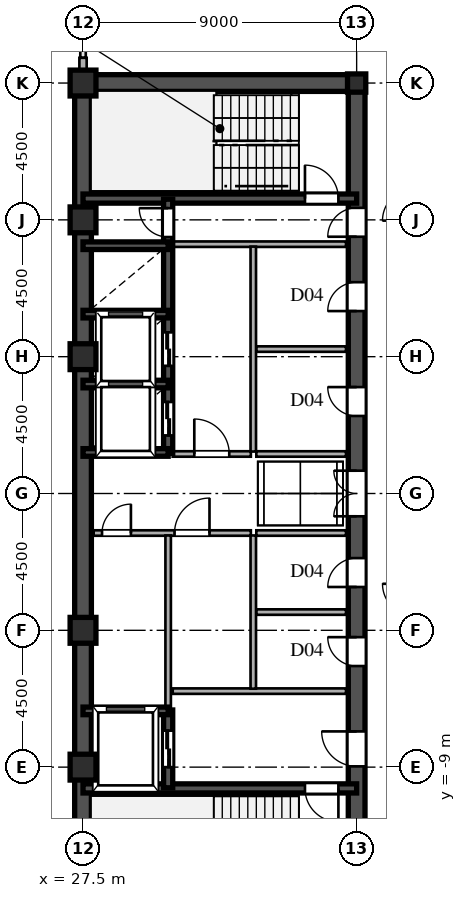
"""IFC4 building model, lengths in metres.
Left out: names, types, materials, properties, quantities, classifications, styles, units other than length and angle.
Written with IfcOpenShell. Run it as: python <this file> out.ifc"""

import sys

from ifc_helpers import new_model, si_unit, direction, frame, frame_2d, origin, origin_2d, place, context, subcontext, project, spatial, rectangle, hollow_rectangle, i_section, extrude, source, transform, mapped, element, fill, save


model = new_model("IFC4")
c1 = context("Model", 3, precision=1e-05, world=origin(), true_north=direction((0.0, 1.0)))
c2 = subcontext(c1, "Body", "Model", "MODEL_VIEW")
j1 = project(units=[si_unit("LENGTHUNIT", "METRE"), si_unit("PLANEANGLEUNIT", "RADIAN")], contexts=[c1])
p1 = place(None, origin())
s1 = spatial("IfcSite", under=j1, at=p1, CompositionType="ELEMENT")
p2 = place(p1, origin())
s2 = spatial("IfcBuilding", under=s1, at=p2, CompositionType="ELEMENT")
p3 = place(p2, frame((0.0, 0.0, 192.3)))
s3 = spatial("IfcBuildingStorey", under=s2, at=p3, CompositionType="ELEMENT", Elevation=192.3)
m1 = source(origin(), c2, "Body", "SweptSolid", [
    extrude(hollow_rectangle(XDim=0.85, YDim=0.85, WallThickness=0.036, at=origin_2d()), origin(), (0.0, 0.0, 1.0), 3.6),
])
for number, where, z_axis, x_axis in (
    (1, (27.5, -9.0, 0.0), (0.0, 0.0, 1.0), (1.0, 0.0, 0.0)),
    (2, (27.5, -4.5, 0.0), (0.0, 0.0, 1.0), (1.0, 0.0, 0.0)),
    (3, (27.5, 4.5, 0.0), (0.0, 0.0, 1.0), (1.0, 0.0, 0.0)),
    (4, (27.5, 9.0, 0.0), (0.0, 0.0, 1.0), (1.0, 0.0, 0.0)),
    (5, (27.5, 13.5, 0.0), (0.0, 0.0, 1.0), (1.0, 0.0, 0.0)),
):
    element("IfcColumn", number, at=place(p3, frame(where, z_axis=z_axis, x_axis=x_axis)), inside=s3, PredefinedType="COLUMN", context=c2, shape_type="MappedRepresentation", body=[
        mapped(m1, transform((0.0, 0.0, 0.0), scale=1.0)),
    ])
m2 = source(origin(), c2, "Body", "SweptSolid", [
    extrude(i_section(OverallWidth=0.6, OverallDepth=0.6, WebThickness=0.025, FlangeThickness=0.04, at=origin_2d()), origin(), (0.0, 0.0, 1.0), 3.6),
])
p4 = place(p3, frame((36.5, 13.5, 0.0), z_axis=(0.0, 0.0, 1.0), x_axis=(1.0, 0.0, 0.0)))
e6 = element("IfcColumn", 6, at=p4, inside=s3, PredefinedType="COLUMN", context=c2, shape_type="MappedRepresentation", body=[
    mapped(m2, transform((0.0, 0.0, 0.0), scale=1.0)),
])
p5 = place(p3, frame((27.5, 13.78, 0.0), z_axis=(0.0, 0.0, 1.0), x_axis=(0.0, 1.0, 0.0)))
e7 = element("IfcWall", 7, at=p5, inside=s3, PredefinedType="SOLIDWALL", context=c2, shape_type="SweptSolid", body=[
    extrude(rectangle(XDim=0.55, YDim=0.24, at=frame_2d((0.275, 0.0))), origin(), (0.0, 0.0, 1.0), 1.88),
])
for number, where, z_axis, x_axis in (
    (8, (27.5, -13.5, 0.0), (0.0, 0.0, 1.0), (0.0, 1.0, 0.0)),
    (9, (27.5, 1.3, 0.0), (0.0, 0.0, 1.0), (0.0, 1.0, 0.0)),
):
    element("IfcWall", number, at=place(p3, frame(where, z_axis=z_axis, x_axis=x_axis)), inside=s3, PredefinedType="SHEAR", context=c2, shape_type="SweptSolid", body=[
        extrude(rectangle(XDim=12.2, YDim=0.55, at=frame_2d((6.1, 0.0))), origin(), (0.0, 0.0, 1.0), 3.38),
    ])
p6 = place(p3, frame((27.5, -1.3, 0.0), z_axis=(0.0, 0.0, 1.0), x_axis=(0.0, 1.0, 0.0)))
e10 = element("IfcWall", 10, at=p6, inside=s3, PredefinedType="SHEAR", context=c2, shape_type="SweptSolid", body=[
    extrude(rectangle(XDim=2.6, YDim=0.55, at=frame_2d((1.3, 0.0))), origin(), (0.0, 0.0, 1.0), 3.38),
])
p7 = place(p3, frame((27.5, 13.5, 0.0), z_axis=(0.0, 0.0, 1.0), x_axis=(1.0, 0.0, 0.0)))
e11 = element("IfcWall", 11, at=p7, inside=s3, PredefinedType="SHEAR", context=c2, shape_type="SweptSolid", body=[
    extrude(rectangle(XDim=9.0, YDim=0.55, at=frame_2d((4.5, 0.0))), origin(), (0.0, 0.0, 1.0), 3.38),
])
p8 = place(p3, frame((36.5, -13.65, 0.0), z_axis=(0.0, 0.0, 1.0), x_axis=(0.0, 1.0, 0.0)))
e12 = element("IfcWall", 12, at=p8, inside=s3, PredefinedType="SHEAR", context=c2, shape_type="SweptSolid", body=[
    extrude(rectangle(XDim=7.15, YDim=0.55, at=frame_2d((3.575, 0.0))), origin(), (0.0, 0.0, 1.0), 3.38),
])
p9 = place(p8, frame((4.675, 0.0, 0.0)))
e13 = element("IfcOpeningElement", 13, at=p9, cuts=e12, PredefinedType="OPENING", context=c2, shape_type="SweptSolid", body=[
    extrude(rectangle(XDim=1.15, YDim=2.2, at=frame_2d((0.575, 1.1))), frame((0.0, 0.285, 0.0), z_axis=(0.0, -1.0, 0.0), x_axis=(1.0, 0.0, 0.0)), (0.0, 0.0, 1.0), 0.57),
])
p10 = place(p3, frame((36.5, -1.3, 0.0), z_axis=(0.0, 0.0, 1.0), x_axis=(0.0, 1.0, 0.0)))
e14 = element("IfcWall", 14, at=p10, inside=s3, PredefinedType="SHEAR", context=c2, shape_type="SweptSolid", body=[
    extrude(rectangle(XDim=2.6, YDim=0.55, at=frame_2d((1.3, 0.0))), origin(), (0.0, 0.0, 1.0), 3.38),
])
p11 = place(p10, frame((0.55, 0.0, 0.0)))
e15 = element("IfcOpeningElement", 15, at=p11, cuts=e14, PredefinedType="OPENING", context=c2, shape_type="SweptSolid", body=[
    extrude(rectangle(XDim=1.5, YDim=2.3, at=frame_2d((0.75, 1.15))), frame((0.0, 0.285, 0.0), z_axis=(0.0, -1.0, 0.0), x_axis=(1.0, 0.0, 0.0)), (0.0, 0.0, 1.0), 0.57),
])
p12 = place(p3, frame((36.5, 8.2, 0.0), z_axis=(0.0, 0.0, 1.0), x_axis=(0.0, 1.0, 0.0)))
e16 = element("IfcWall", 16, at=p12, inside=s3, PredefinedType="SHEAR", context=c2, shape_type="SweptSolid", body=[
    extrude(rectangle(XDim=5.45, YDim=0.55, at=frame_2d((2.725, 0.0))), origin(), (0.0, 0.0, 1.0), 3.38),
])
p13 = place(p12, frame((0.245, 0.0, 0.0)))
e17 = element("IfcOpeningElement", 17, at=p13, cuts=e16, PredefinedType="OPENING", context=c2, shape_type="SweptSolid", body=[
    extrude(rectangle(XDim=0.95, YDim=2.15, at=frame_2d((0.475, 1.075))), frame((0.0, 0.285, 0.0), z_axis=(0.0, -1.0, 0.0), x_axis=(1.0, 0.0, 0.0)), (0.0, 0.0, 1.0), 0.57),
])
p14 = place(p3, frame((36.5, -6.5, 0.0), z_axis=(0.0, 0.0, 1.0), x_axis=(0.0, 1.0, 0.0)))
e18 = element("IfcWall", 18, at=p14, inside=s3, PredefinedType="SHEAR", context=c2, shape_type="SweptSolid", body=[
    extrude(rectangle(XDim=2.6, YDim=0.55, at=frame_2d((1.3, 0.0))), origin(), (0.0, 0.0, 1.0), 3.38),
])
p15 = place(p14, frame((0.825, 0.0, 0.0)))
e19 = element("IfcOpeningElement", 19, at=p15, cuts=e18, PredefinedType="OPENING", context=c2, shape_type="SweptSolid", body=[
    extrude(rectangle(XDim=0.95, YDim=2.15, at=frame_2d((0.475, 1.075))), frame((0.0, 0.285, 0.0), z_axis=(0.0, -1.0, 0.0), x_axis=(1.0, 0.0, 0.0)), (0.0, 0.0, 1.0), 0.57),
])
p16 = place(p3, frame((36.5, -3.9, 0.0), z_axis=(0.0, 0.0, 1.0), x_axis=(0.0, 1.0, 0.0)))
e20 = element("IfcWall", 20, at=p16, inside=s3, PredefinedType="SHEAR", context=c2, shape_type="SweptSolid", body=[
    extrude(rectangle(XDim=2.6, YDim=0.55, at=frame_2d((1.3, 0.0))), origin(), (0.0, 0.0, 1.0), 3.38),
])
p17 = place(p16, frame((0.825, 0.0, 0.0)))
e21 = element("IfcOpeningElement", 21, at=p17, cuts=e20, PredefinedType="OPENING", context=c2, shape_type="SweptSolid", body=[
    extrude(rectangle(XDim=0.95, YDim=2.15, at=frame_2d((0.475, 1.075))), frame((0.0, 0.285, 0.0), z_axis=(0.0, -1.0, 0.0), x_axis=(1.0, 0.0, 0.0)), (0.0, 0.0, 1.0), 0.57),
])
p18 = place(p3, frame((36.5, 1.3, 0.0), z_axis=(0.0, 0.0, 1.0), x_axis=(0.0, 1.0, 0.0)))
e22 = element("IfcWall", 22, at=p18, inside=s3, PredefinedType="SHEAR", context=c2, shape_type="SweptSolid", body=[
    extrude(rectangle(XDim=3.45, YDim=0.55, at=frame_2d((1.725, 0.0))), origin(), (0.0, 0.0, 1.0), 3.38),
])
p19 = place(p18, frame((1.25, 0.0, 0.0)))
e23 = element("IfcOpeningElement", 23, at=p19, cuts=e22, PredefinedType="OPENING", context=c2, shape_type="SweptSolid", body=[
    extrude(rectangle(XDim=0.95, YDim=2.15, at=frame_2d((0.475, 1.075))), frame((0.0, 0.285, 0.0), z_axis=(0.0, -1.0, 0.0), x_axis=(1.0, 0.0, 0.0)), (0.0, 0.0, 1.0), 0.57),
])
p20 = place(p3, frame((36.5, 4.75, 0.0), z_axis=(0.0, 0.0, 1.0), x_axis=(0.0, 1.0, 0.0)))
e24 = element("IfcWall", 24, at=p20, inside=s3, PredefinedType="SHEAR", context=c2, shape_type="SweptSolid", body=[
    extrude(rectangle(XDim=3.45, YDim=0.55, at=frame_2d((1.725, 0.0))), origin(), (0.0, 0.0, 1.0), 3.38),
])
p21 = place(p20, frame((1.25, 0.0, 0.0)))
e25 = element("IfcOpeningElement", 25, at=p21, cuts=e24, PredefinedType="OPENING", context=c2, shape_type="SweptSolid", body=[
    extrude(rectangle(XDim=0.95, YDim=2.15, at=frame_2d((0.475, 1.075))), frame((0.0, 0.285, 0.0), z_axis=(0.0, -1.0, 0.0), x_axis=(1.0, 0.0, 0.0)), (0.0, 0.0, 1.0), 0.57),
])
p22 = place(p3, frame((27.5, -9.7, 0.0), z_axis=(0.0, 0.0, 1.0), x_axis=(1.0, 0.0, 0.0)))
e26 = element("IfcWall", 26, at=p22, inside=s3, PredefinedType="SHEAR", context=c2, shape_type="SweptSolid", body=[
    extrude(rectangle(XDim=9.0, YDim=0.3, at=frame_2d((4.5, 0.0))), origin(), (0.0, 0.0, 1.0), 3.38),
])
p23 = place(p22, frame((7.3, 0.0, 0.0)))
e27 = element("IfcOpeningElement", 27, at=p23, cuts=e26, PredefinedType="OPENING", context=c2, shape_type="SweptSolid", body=[
    extrude(rectangle(XDim=1.1, YDim=2.2, at=frame_2d((0.55, 1.1))), frame((0.0, 0.16, 0.0), z_axis=(0.0, -1.0, 0.0), x_axis=(1.0, 0.0, 0.0)), (0.0, 0.0, 1.0), 0.32),
])
p24 = place(p3, frame((27.5, 9.7, 0.0), z_axis=(0.0, 0.0, 1.0), x_axis=(1.0, 0.0, 0.0)))
e28 = element("IfcWall", 28, at=p24, inside=s3, PredefinedType="SHEAR", context=c2, shape_type="SweptSolid", body=[
    extrude(rectangle(XDim=9.0, YDim=0.3, at=frame_2d((4.5, 0.0))), origin(), (0.0, 0.0, 1.0), 3.38),
])
p25 = place(p24, frame((7.3, 0.0, 0.0)))
e29 = element("IfcOpeningElement", 29, at=p25, cuts=e28, PredefinedType="OPENING", context=c2, shape_type="SweptSolid", body=[
    extrude(rectangle(XDim=1.1, YDim=2.2, at=frame_2d((0.55, 1.1))), frame((0.0, 0.16, 0.0), z_axis=(0.0, -1.0, 0.0), x_axis=(1.0, 0.0, 0.0)), (0.0, 0.0, 1.0), 0.32),
])
for number, where, z_axis, x_axis in (
    (30, (27.5, -7.15, 0.0), (0.0, 0.0, 1.0), (1.0, 0.0, 0.0)),
    (31, (27.5, 1.35, 0.0), (0.0, 0.0, 1.0), (1.0, 0.0, 0.0)),
    (32, (27.5, 3.6, 0.0), (0.0, 0.0, 1.0), (1.0, 0.0, 0.0)),
    (33, (27.5, 5.9, 0.0), (0.0, 0.0, 1.0), (1.0, 0.0, 0.0)),
    (34, (27.5, 8.15, 0.0), (0.0, 0.0, 1.0), (1.0, 0.0, 0.0)),
):
    element("IfcWall", number, at=place(p3, frame(where, z_axis=z_axis, x_axis=x_axis)), inside=s3, PredefinedType="SHEAR", context=c2, shape_type="SweptSolid", body=[
        extrude(rectangle(XDim=2.8, YDim=0.25, at=frame_2d((1.4, 0.0))), origin(), (0.0, 0.0, 1.0), 3.38),
    ])
p26 = place(p3, frame((30.3, -9.68, 0.0), z_axis=(0.0, 0.0, 1.0), x_axis=(0.0, 1.0, 0.0)))
e35 = element("IfcWall", 35, at=p26, inside=s3, PredefinedType="SHEAR", context=c2, shape_type="SweptSolid", body=[
    extrude(rectangle(XDim=2.56, YDim=0.3, at=frame_2d((1.28, 0.0))), origin(), (0.0, 0.0, 1.0), 3.38),
])
p27 = place(p26, frame((0.68, 0.0, 0.0)))
e36 = element("IfcOpeningElement", 36, at=p27, cuts=e35, PredefinedType="OPENING", context=c2, shape_type="SweptSolid", body=[
    extrude(rectangle(XDim=1.2, YDim=2.25, at=frame_2d((0.6, 1.125))), frame((0.0, 0.16, 0.0), z_axis=(0.0, -1.0, 0.0), x_axis=(1.0, 0.0, 0.0)), (0.0, 0.0, 1.0), 0.32),
])
p28 = place(p3, frame((30.3, 1.32, 0.0), z_axis=(0.0, 0.0, 1.0), x_axis=(0.0, 1.0, 0.0)))
e37 = element("IfcWall", 37, at=p28, inside=s3, PredefinedType="SHEAR", context=c2, shape_type="SweptSolid", body=[
    extrude(rectangle(XDim=2.28, YDim=0.3, at=frame_2d((1.14, 0.0))), origin(), (0.0, 0.0, 1.0), 3.38),
])
p29 = place(p28, frame((0.59, 0.0, 0.0)))
e38 = element("IfcOpeningElement", 38, at=p29, cuts=e37, PredefinedType="OPENING", context=c2, shape_type="SweptSolid", body=[
    extrude(rectangle(XDim=1.1, YDim=2.2, at=frame_2d((0.55, 1.1))), frame((0.0, 0.16, 0.0), z_axis=(0.0, -1.0, 0.0), x_axis=(1.0, 0.0, 0.0)), (0.0, 0.0, 1.0), 0.32),
])
p30 = place(p3, frame((30.3, 3.6, 0.0), z_axis=(0.0, 0.0, 1.0), x_axis=(0.0, 1.0, 0.0)))
e39 = element("IfcWall", 39, at=p30, inside=s3, PredefinedType="SHEAR", context=c2, shape_type="SweptSolid", body=[
    extrude(rectangle(XDim=2.3, YDim=0.3, at=frame_2d((1.15, 0.0))), origin(), (0.0, 0.0, 1.0), 3.38),
])
p31 = place(p30, frame((0.6, 0.0, 0.0)))
e40 = element("IfcOpeningElement", 40, at=p31, cuts=e39, PredefinedType="OPENING", context=c2, shape_type="SweptSolid", body=[
    extrude(rectangle(XDim=1.1, YDim=2.2, at=frame_2d((0.55, 1.1))), frame((0.0, 0.16, 0.0), z_axis=(0.0, -1.0, 0.0), x_axis=(1.0, 0.0, 0.0)), (0.0, 0.0, 1.0), 0.32),
])
p32 = place(p3, frame((30.3, 5.9, 0.0), z_axis=(0.0, 0.0, 1.0), x_axis=(0.0, 1.0, 0.0)))
e41 = element("IfcWall", 41, at=p32, inside=s3, PredefinedType="SHEAR", context=c2, shape_type="SweptSolid", body=[
    extrude(rectangle(XDim=2.25, YDim=0.3, at=frame_2d((1.125, 0.0))), origin(), (0.0, 0.0, 1.0), 3.38),
])
p33 = place(p3, frame((30.3, 8.15, 0.0), z_axis=(0.0, 0.0, 1.0), x_axis=(0.0, 1.0, 0.0)))
e42 = element("IfcWall", 42, at=p33, inside=s3, PredefinedType="SHEAR", context=c2, shape_type="SweptSolid", body=[
    extrude(rectangle(XDim=1.53, YDim=0.3, at=frame_2d((0.765, 0.0))), origin(), (0.0, 0.0, 1.0), 3.38),
])
p34 = place(p33, frame((0.285, 0.0, 0.0)))
e43 = element("IfcOpeningElement", 43, at=p34, cuts=e42, PredefinedType="OPENING", context=c2, shape_type="SweptSolid", body=[
    extrude(rectangle(XDim=0.95, YDim=2.15, at=frame_2d((0.475, 1.075))), frame((0.0, 0.16, 0.0), z_axis=(0.0, -1.0, 0.0), x_axis=(1.0, 0.0, 0.0)), (0.0, 0.0, 1.0), 0.32),
])
for number, where, z_axis, x_axis in (
    (44, (30.45, -6.5, 0.0), (0.0, 0.0, 1.0), (1.0, 0.0, 0.0)),
    (45, (30.45, 8.2, 0.0), (0.0, 0.0, 1.0), (1.0, 0.0, 0.0)),
):
    element("IfcWall", number, at=place(p3, frame(where, z_axis=z_axis, x_axis=x_axis)), inside=s3, PredefinedType="PARTITIONING", context=c2, shape_type="SweptSolid", body=[
        extrude(rectangle(XDim=5.7, YDim=0.18, at=frame_2d((2.85, 0.0))), origin(), (0.0, 0.0, 1.0), 3.38),
    ])
p35 = place(p3, frame((33.1, -6.42, 0.0), z_axis=(0.0, 0.0, 1.0), x_axis=(0.0, 1.0, 0.0)))
e46 = element("IfcWall", 46, at=p35, inside=s3, PredefinedType="PARTITIONING", context=c2, shape_type="SweptSolid", body=[
    extrude(rectangle(XDim=5.04, YDim=0.18, at=frame_2d((2.52, 0.0))), origin(), (0.0, 0.0, 1.0), 3.38),
])
p36 = place(p3, frame((33.1, 1.38, 0.0), z_axis=(0.0, 0.0, 1.0), x_axis=(0.0, 1.0, 0.0)))
e47 = element("IfcWall", 47, at=p36, inside=s3, PredefinedType="PARTITIONING", context=c2, shape_type="SweptSolid", body=[
    extrude(rectangle(XDim=6.74, YDim=0.18, at=frame_2d((3.37, 0.0))), origin(), (0.0, 0.0, 1.0), 3.38),
])
p37 = place(p3, frame((27.85, -1.3, 0.0), z_axis=(0.0, 0.0, 1.0), x_axis=(1.0, 0.0, 0.0)))
e48 = element("IfcWall", 48, at=p37, inside=s3, PredefinedType="PARTITIONING", context=c2, shape_type="SweptSolid", body=[
    extrude(rectangle(XDim=2.45, YDim=0.18, at=frame_2d((1.225, 0.0))), origin(), (0.0, 0.0, 1.0), 3.38),
])
p38 = place(p37, frame((0.275, 0.0, 0.0)))
e49 = element("IfcOpeningElement", 49, at=p38, cuts=e48, PredefinedType="OPENING", context=c2, shape_type="SweptSolid", body=[
    extrude(rectangle(XDim=0.95, YDim=2.15, at=frame_2d((0.475, 1.075))), frame((0.0, 0.1, 0.0), z_axis=(0.0, -1.0, 0.0), x_axis=(1.0, 0.0, 0.0)), (0.0, 0.0, 1.0), 0.2),
])
p39 = place(p3, frame((30.3, -1.3, 0.0), z_axis=(0.0, 0.0, 1.0), x_axis=(1.0, 0.0, 0.0)))
e50 = element("IfcWall", 50, at=p39, inside=s3, PredefinedType="PARTITIONING", context=c2, shape_type="SweptSolid", body=[
    extrude(rectangle(XDim=2.72, YDim=0.18, at=frame_2d((1.36, 0.0))), origin(), (0.0, 0.0, 1.0), 3.38),
])
p40 = place(p39, frame((0.21, 0.0, 0.0)))
e51 = element("IfcOpeningElement", 51, at=p40, cuts=e50, PredefinedType="OPENING", context=c2, shape_type="SweptSolid", body=[
    extrude(rectangle(XDim=1.15, YDim=2.2, at=frame_2d((0.575, 1.1))), frame((0.0, 0.1, 0.0), z_axis=(0.0, -1.0, 0.0), x_axis=(1.0, 0.0, 0.0)), (0.0, 0.0, 1.0), 0.2),
])
p41 = place(p3, frame((30.3, -7.12, 0.0), z_axis=(0.0, 0.0, 1.0), x_axis=(0.0, 1.0, 0.0)))
e52 = element("IfcWall", 52, at=p41, inside=s3, PredefinedType="PARTITIONING", context=c2, shape_type="SweptSolid", body=[
    extrude(rectangle(XDim=5.74, YDim=0.18, at=frame_2d((2.87, 0.0))), origin(), (0.0, 0.0, 1.0), 3.38),
])
p42 = place(p3, frame((30.45, 1.3, 0.0), z_axis=(0.0, 0.0, 1.0), x_axis=(1.0, 0.0, 0.0)))
e53 = element("IfcWall", 53, at=p42, inside=s3, PredefinedType="PARTITIONING", context=c2, shape_type="SweptSolid", body=[
    extrude(rectangle(XDim=2.57, YDim=0.18, at=frame_2d((1.285, 0.0))), origin(), (0.0, 0.0, 1.0), 3.38),
])
p43 = place(p42, frame((0.71, 0.0, 0.0)))
e54 = element("IfcOpeningElement", 54, at=p43, cuts=e53, PredefinedType="OPENING", context=c2, shape_type="SweptSolid", body=[
    extrude(rectangle(XDim=1.15, YDim=2.2, at=frame_2d((0.575, 1.1))), frame((0.0, 0.1, 0.0), z_axis=(0.0, -1.0, 0.0), x_axis=(1.0, 0.0, 0.0)), (0.0, 0.0, 1.0), 0.2),
])
for number, where, z_axis, x_axis in (
    (55, (33.2, -1.3, 0.0), (0.0, 0.0, 1.0), (1.0, 0.0, 0.0)),
    (56, (33.2, 1.3, 0.0), (0.0, 0.0, 1.0), (1.0, 0.0, 0.0)),
    (57, (33.2, -3.9, 0.0), (0.0, 0.0, 1.0), (1.0, 0.0, 0.0)),
    (58, (33.2, 4.75, 0.0), (0.0, 0.0, 1.0), (1.0, 0.0, 0.0)),
):
    element("IfcWall", number, at=place(p3, frame(where, z_axis=z_axis, x_axis=x_axis)), inside=s3, PredefinedType="PARTITIONING", context=c2, shape_type="SweptSolid", body=[
        extrude(rectangle(XDim=2.95, YDim=0.18, at=frame_2d((1.475, 0.0))), origin(), (0.0, 0.0, 1.0), 3.38),
    ])
m3 = source(origin(), c2, "Body", "SweptSolid", [
    extrude(rectangle(XDim=1.15, YDim=2.2, at=frame_2d((0.575, 1.1))), frame((0.0, 0.025, 0.0), z_axis=(0.0, -1.0, 0.0), x_axis=(1.0, 0.0, 0.0)), (0.0, 0.0, 1.0), 0.05),
])
p44 = place(p9, origin())
e59 = element("IfcDoor", 59, at=p44, inside=s3, OperationType="SINGLE_SWING_RIGHT", PredefinedType="DOOR", context=c2, shape_type="MappedRepresentation", body=[
    mapped(m3, transform((0.0, 0.0, 0.0), scale=1.0)),
])
fill(e13, e59)
m4 = source(origin(), c2, "Body", "SweptSolid", [
    extrude(rectangle(XDim=1.5, YDim=2.3, at=frame_2d((0.75, 1.15))), frame((0.0, 0.025, 0.0), z_axis=(0.0, -1.0, 0.0), x_axis=(1.0, 0.0, 0.0)), (0.0, 0.0, 1.0), 0.05),
])
p45 = place(p11, origin())
e60 = element("IfcDoor", 60, at=p45, inside=s3, OperationType="DOUBLE_SWING_LEFT", PredefinedType="DOOR", context=c2, shape_type="MappedRepresentation", body=[
    mapped(m4, transform((0.0, 0.0, 0.0), scale=1.0)),
])
fill(e15, e60)
m5 = source(origin(), c2, "Body", "SweptSolid", [
    extrude(rectangle(XDim=0.95, YDim=2.15, at=frame_2d((0.475, 1.075))), frame((0.0, 0.025, 0.0), z_axis=(0.0, -1.0, 0.0), x_axis=(1.0, 0.0, 0.0)), (0.0, 0.0, 1.0), 0.05),
])
p46 = place(p13, origin())
e61 = element("IfcDoor", 61, at=p46, inside=s3, OperationType="SINGLE_SWING_LEFT", PredefinedType="DOOR", context=c2, shape_type="MappedRepresentation", body=[
    mapped(m5, transform((0.0, 0.0, 0.0), scale=1.0)),
])
fill(e17, e61)
p47 = place(p15, origin())
e62 = element("IfcDoor", 62, at=p47, inside=s3, OperationType="SINGLE_SWING_RIGHT", PredefinedType="DOOR", context=c2, shape_type="MappedRepresentation", body=[
    mapped(m5, transform((0.0, 0.0, 0.0), scale=1.0)),
])
fill(e19, e62)
p48 = place(p17, origin())
e63 = element("IfcDoor", 63, at=p48, inside=s3, OperationType="SINGLE_SWING_LEFT", PredefinedType="DOOR", context=c2, shape_type="MappedRepresentation", body=[
    mapped(m5, transform((0.0, 0.0, 0.0), scale=1.0)),
])
fill(e21, e63)
p49 = place(p19, origin())
e64 = element("IfcDoor", 64, at=p49, inside=s3, OperationType="SINGLE_SWING_RIGHT", PredefinedType="DOOR", context=c2, shape_type="MappedRepresentation", body=[
    mapped(m5, transform((0.0, 0.0, 0.0), scale=1.0)),
])
fill(e23, e64)
p50 = place(p21, origin())
e65 = element("IfcDoor", 65, at=p50, inside=s3, OperationType="SINGLE_SWING_LEFT", PredefinedType="DOOR", context=c2, shape_type="MappedRepresentation", body=[
    mapped(m5, transform((0.0, 0.0, 0.0), scale=1.0)),
])
fill(e25, e65)
m6 = source(origin(), c2, "Body", "SweptSolid", [
    extrude(rectangle(XDim=1.1, YDim=2.2, at=frame_2d((0.55, 1.1))), frame((0.0, 0.025, 0.0), z_axis=(0.0, -1.0, 0.0), x_axis=(1.0, 0.0, 0.0)), (0.0, 0.0, 1.0), 0.05),
])
p51 = place(p23, frame((1.1, 0.0, 0.0), z_axis=(0.0, 0.0, 1.0), x_axis=(-1.0, 0.0, 0.0)))
e66 = element("IfcDoor", 66, at=p51, inside=s3, OperationType="SINGLE_SWING_RIGHT", PredefinedType="DOOR", context=c2, shape_type="MappedRepresentation", body=[
    mapped(m6, transform((0.0, 0.0, 0.0), scale=1.0)),
])
fill(e27, e66)
p52 = place(p25, origin())
e67 = element("IfcDoor", 67, at=p52, inside=s3, OperationType="SINGLE_SWING_LEFT", PredefinedType="DOOR", context=c2, shape_type="MappedRepresentation", body=[
    mapped(m6, transform((0.0, 0.0, 0.0), scale=1.0)),
])
fill(e29, e67)
m7 = source(origin(), c2, "Body", "SweptSolid", [
    extrude(rectangle(XDim=1.2, YDim=2.25, at=frame_2d((0.6, 1.125))), frame((0.0, 0.025, 0.0), z_axis=(0.0, -1.0, 0.0), x_axis=(1.0, 0.0, 0.0)), (0.0, 0.0, 1.0), 0.05),
])
p53 = place(p27, origin())
e68 = element("IfcDoor", 68, at=p53, inside=s3, OperationType="DOUBLE_DOOR_SLIDING", PredefinedType="DOOR", context=c2, shape_type="MappedRepresentation", body=[
    mapped(m7, transform((0.0, 0.0, 0.0), scale=1.0)),
])
fill(e36, e68)
m8 = source(origin(), c2, "Body", "SweptSolid", [
    extrude(rectangle(XDim=1.1, YDim=2.2, at=frame_2d((0.55, 1.1))), frame((0.0, 0.025, 0.0), z_axis=(0.0, -1.0, 0.0), x_axis=(1.0, 0.0, 0.0)), (0.0, 0.0, 1.0), 0.05),
])
p54 = place(p29, origin())
e69 = element("IfcDoor", 69, at=p54, inside=s3, OperationType="DOUBLE_DOOR_SLIDING", PredefinedType="DOOR", context=c2, shape_type="MappedRepresentation", body=[
    mapped(m8, transform((0.0, 0.0, 0.0), scale=1.0)),
])
fill(e38, e69)
p55 = place(p31, origin())
e70 = element("IfcDoor", 70, at=p55, inside=s3, OperationType="DOUBLE_DOOR_SLIDING", PredefinedType="DOOR", context=c2, shape_type="MappedRepresentation", body=[
    mapped(m8, transform((0.0, 0.0, 0.0), scale=1.0)),
])
fill(e40, e70)
p56 = place(p34, origin())
e71 = element("IfcDoor", 71, at=p56, inside=s3, OperationType="SINGLE_SWING_RIGHT", PredefinedType="DOOR", context=c2, shape_type="MappedRepresentation", body=[
    mapped(m5, transform((0.0, 0.0, 0.0), scale=1.0)),
])
fill(e43, e71)
p57 = place(p38, origin())
e72 = element("IfcDoor", 72, at=p57, inside=s3, OperationType="SINGLE_SWING_RIGHT", PredefinedType="DOOR", context=c2, shape_type="MappedRepresentation", body=[
    mapped(m5, transform((0.0, 0.0, 0.0), scale=1.0)),
])
fill(e49, e72)
p58 = place(p40, origin())
e73 = element("IfcDoor", 73, at=p58, inside=s3, OperationType="SINGLE_SWING_RIGHT", PredefinedType="DOOR", context=c2, shape_type="MappedRepresentation", body=[
    mapped(m3, transform((0.0, 0.0, 0.0), scale=1.0)),
])
fill(e51, e73)
p59 = place(p43, origin())
e74 = element("IfcDoor", 74, at=p59, inside=s3, OperationType="SINGLE_SWING_LEFT", PredefinedType="DOOR", context=c2, shape_type="MappedRepresentation", body=[
    mapped(m3, transform((0.0, 0.0, 0.0), scale=1.0)),
])
fill(e54, e74)
save(model, sys.argv[1])
